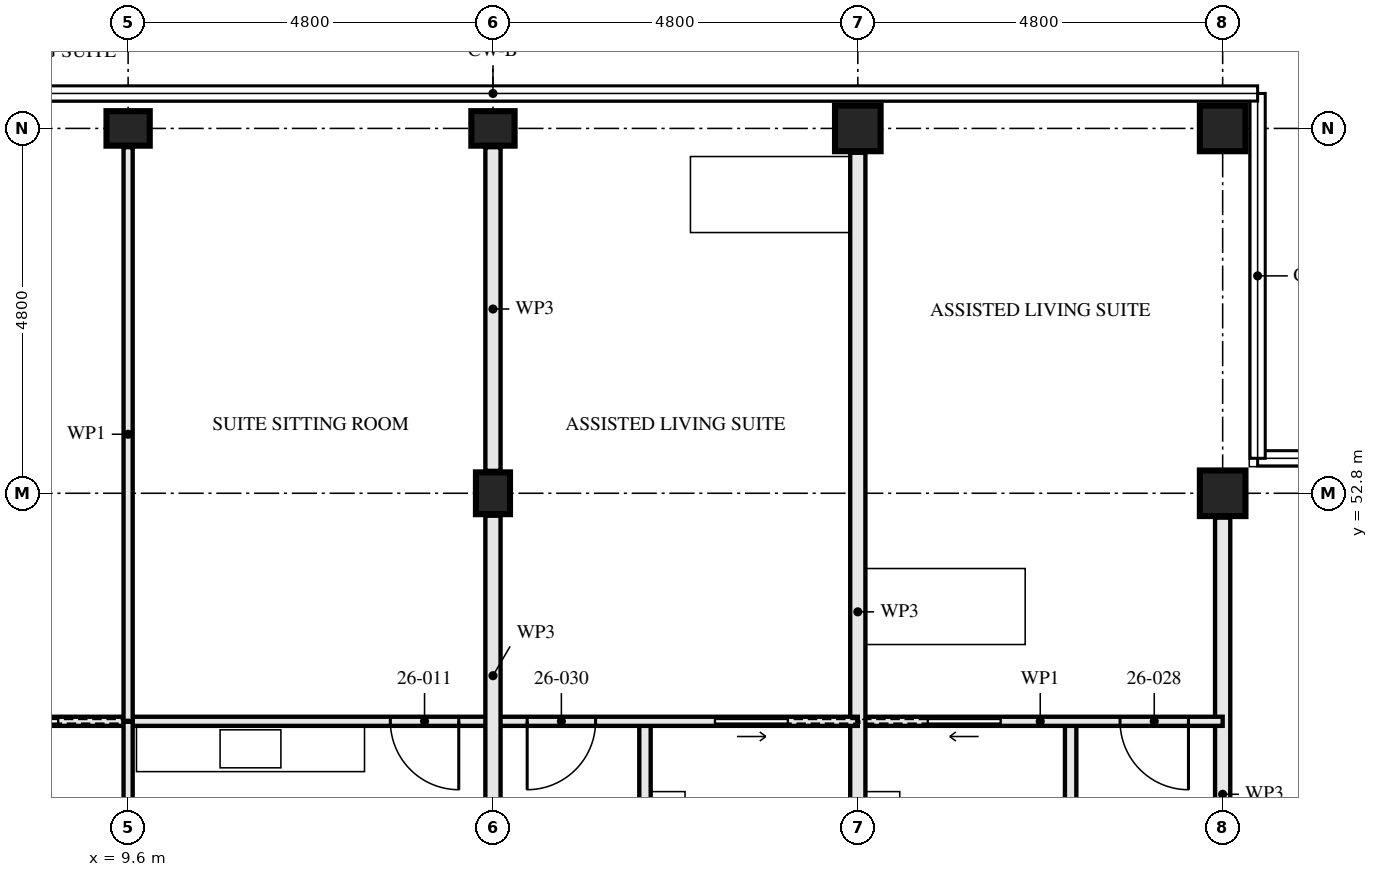
"""IFC4 building model, lengths in metres.
Left out: names, types, materials, properties, quantities, classifications, styles, units other than length and angle.
Written with IfcOpenShell. Run it as: python <this file> out.ifc"""

import sys

from ifc_helpers import new_model, si_unit, direction, frame, frame_2d, origin, origin_2d, place, context, subcontext, project, spatial, rectangle, hollow_rectangle, i_section, extrude, element, fill, save


model = new_model("IFC4")
c1 = context("Model", 3, precision=1e-05, world=origin(), true_north=direction((0.0, 1.0)))
c2 = subcontext(c1, "Body", "Model", "MODEL_VIEW")
j1 = project(units=[si_unit("LENGTHUNIT", "METRE"), si_unit("PLANEANGLEUNIT", "RADIAN")], contexts=[c1])
p1 = place(None, origin())
s1 = spatial("IfcSite", under=j1, at=p1, CompositionType="ELEMENT")
p2 = place(p1, origin())
s2 = spatial("IfcBuilding", under=s1, at=p2, CompositionType="ELEMENT")
p3 = place(p2, frame((0.0, 0.0, 98.0)))
s3 = spatial("IfcBuildingStorey", under=s2, at=p3, CompositionType="ELEMENT", Elevation=98.0)
p4 = place(p3, frame((9.6, 57.6, 0.0), z_axis=(0.0, 0.0, 1.0), x_axis=(0.0, 1.0, 0.0)))
e1 = element("IfcColumn", 1, at=p4, inside=s3, PredefinedType="COLUMN", context=c2, shape_type="SweptSolid", body=[
    extrude(i_section(OverallWidth=0.454, OverallDepth=0.569, WebThickness=0.078, FlangeThickness=0.125, FilletRadius=0.015, at=origin_2d()), origin(), (0.0, 0.0, 1.0), 3.5),
])
p5 = place(p3, frame((14.4, 52.8, 0.0), z_axis=(0.0, 0.0, 1.0), x_axis=(1.0, 0.0, 0.0)))
e2 = element("IfcColumn", 2, at=p5, inside=s3, PredefinedType="COLUMN", context=c2, shape_type="SweptSolid", body=[
    extrude(i_section(OverallWidth=0.448, OverallDepth=0.55, WebThickness=0.072, FlangeThickness=0.115, FilletRadius=0.015, at=origin_2d()), origin(), (0.0, 0.0, 1.0), 3.5),
])
p6 = place(p3, frame((14.4, 57.6, 0.0), z_axis=(0.0, 0.0, 1.0), x_axis=(0.0, 1.0, 0.0)))
e3 = element("IfcColumn", 3, at=p6, inside=s3, PredefinedType="COLUMN", context=c2, shape_type="SweptSolid", body=[
    extrude(i_section(OverallWidth=0.454, OverallDepth=0.569, WebThickness=0.078, FlangeThickness=0.125, FilletRadius=0.015, at=origin_2d()), origin(), (0.0, 0.0, 1.0), 3.5),
])
for number, where, z_axis, x_axis in (
    (4, (19.2, 57.6, 0.0), (0.0, 0.0, 1.0), (0.0, 1.0, 0.0)),
    (5, (24.0, 52.8, 0.0), (0.0, 0.0, 1.0), (0.0, 1.0, 0.0)),
    (6, (24.0, 57.6, 0.0), (0.0, 0.0, 1.0), (0.0, 1.0, 0.0)),
):
    element("IfcColumn", number, at=place(p3, frame(where, z_axis=z_axis, x_axis=x_axis)), inside=s3, PredefinedType="COLUMN", context=c2, shape_type="SweptSolid", body=[
        extrude(hollow_rectangle(XDim=0.6, YDim=0.6, WallThickness=0.06, at=origin_2d()), origin(), (0.0, 0.0, 1.0), 3.5),
    ])
p7 = place(p3, frame((9.6, 49.8, 0.0), z_axis=(0.0, 0.0, 1.0), x_axis=(0.0, -1.0, 0.0)))
e7 = element("IfcWall", 7, at=p7, inside=s3, PredefinedType="PARTITIONING", context=c2, shape_type="SweptSolid", body=[
    extrude(rectangle(XDim=4.65, YDim=0.12, at=frame_2d((2.325, 0.0))), origin(), (0.0, 0.0, 1.0), 2.55),
])
p8 = place(p7, frame((3.35, 0.0, 0.0)))
e8 = element("IfcOpeningElement", 8, at=p8, cuts=e7, PredefinedType="OPENING", context=c2, shape_type="SweptSolid", body=[
    extrude(rectangle(XDim=0.9, YDim=2.1, at=frame_2d((0.45, 1.05))), frame((0.0, 0.071, 0.0), z_axis=(0.0, -1.0, 0.0), x_axis=(1.0, 0.0, 0.0)), (0.0, 0.0, 1.0), 0.141),
])
p9 = place(p3, frame((14.4, 49.8, 0.0), z_axis=(0.0, 0.0, 1.0), x_axis=(-1.0, 0.0, 0.0)))
e9 = element("IfcWall", 9, at=p9, inside=s3, PredefinedType="PARTITIONING", context=c2, shape_type="SweptSolid", body=[
    extrude(rectangle(XDim=4.8, YDim=0.12, at=frame_2d((2.4, 0.0))), origin(), (0.0, 0.0, 1.0), 3.33),
])
p10 = place(p9, frame((0.45, 0.0, 0.0)))
e10 = element("IfcOpeningElement", 10, at=p10, cuts=e9, PredefinedType="OPENING", context=c2, shape_type="SweptSolid", body=[
    extrude(rectangle(XDim=0.9, YDim=2.1, at=frame_2d((0.45, 1.05))), frame((0.0, 0.071, 0.0), z_axis=(0.0, -1.0, 0.0), x_axis=(1.0, 0.0, 0.0)), (0.0, 0.0, 1.0), 0.141),
])
p11 = place(p3, frame((9.6, 49.8, 0.0), z_axis=(0.0, 0.0, 1.0), x_axis=(-1.0, 0.0, 0.0)))
e11 = element("IfcWall", 11, at=p11, inside=s3, PredefinedType="PARTITIONING", context=c2, shape_type="SweptSolid", body=[
    extrude(rectangle(XDim=4.8, YDim=0.12, at=frame_2d((2.4, 0.0))), origin(), (0.0, 0.0, 1.0), 3.33),
])
p12 = place(p11, frame((3.45, 0.0, 0.0)))
e12 = element("IfcOpeningElement", 12, at=p12, cuts=e11, PredefinedType="OPENING", context=c2, shape_type="SweptSolid", body=[
    extrude(rectangle(XDim=0.9, YDim=2.1, at=frame_2d((0.45, 1.05))), frame((0.0, 0.071, 0.0), z_axis=(0.0, -1.0, 0.0), x_axis=(1.0, 0.0, 0.0)), (0.0, 0.0, 1.0), 0.141),
])
p13 = place(p11, frame((0.925, 0.0, 0.0)))
e13 = element("IfcOpeningElement", 13, at=p13, cuts=e11, PredefinedType="OPENING", context=c2, shape_type="SweptSolid", body=[
    extrude(rectangle(XDim=0.95, YDim=2.1, at=frame_2d((0.475, 1.05))), frame((0.0, 0.071, 0.0), z_axis=(0.0, -1.0, 0.0), x_axis=(1.0, 0.0, 0.0)), (0.0, 0.0, 1.0), 0.141),
])
p14 = place(p3, frame((9.6, 57.353, 0.0), z_axis=(0.0, 0.0, 1.0), x_axis=(0.0, -1.0, 0.0)))
e14 = element("IfcWall", 14, at=p14, inside=s3, PredefinedType="PARTITIONING", context=c2, shape_type="SweptSolid", body=[
    extrude(rectangle(XDim=7.553, YDim=0.12, at=frame_2d((3.776, 0.0))), origin(), (0.0, 0.0, 1.0), 2.55),
])
p15 = place(p3, frame((24.0, 52.48, 0.0), z_axis=(0.0, 0.0, 1.0), x_axis=(0.0, -1.0, 0.0)))
e15 = element("IfcWall", 15, at=p15, inside=s3, PredefinedType="PARTITIONING", context=c2, shape_type="SweptSolid", body=[
    extrude(rectangle(XDim=7.28, YDim=0.2, at=frame_2d((3.64, 0.0))), origin(), (0.0, 0.0, 1.0), 2.55),
])
p16 = place(p3, frame((22.0, 49.8, 0.0), z_axis=(0.0, 0.0, 1.0), x_axis=(0.0, -1.0, 0.0)))
e16 = element("IfcWall", 16, at=p16, inside=s3, PredefinedType="PARTITIONING", context=c2, shape_type="SweptSolid", body=[
    extrude(rectangle(XDim=3.0, YDim=0.15, at=frame_2d((1.5, 0.0))), origin(), (0.0, 0.0, 1.0), 2.55),
])
p17 = place(p3, frame((24.0, 49.8, 0.0), z_axis=(0.0, 0.0, 1.0), x_axis=(-1.0, 0.0, 0.0)))
e17 = element("IfcWall", 17, at=p17, inside=s3, PredefinedType="PARTITIONING", context=c2, shape_type="SweptSolid", body=[
    extrude(rectangle(XDim=4.8, YDim=0.12, at=frame_2d((2.4, 0.0))), origin(), (0.0, 0.0, 1.0), 3.33),
])
p18 = place(p17, frame((0.45, 0.0, 0.0)))
e18 = element("IfcOpeningElement", 18, at=p18, cuts=e17, PredefinedType="OPENING", context=c2, shape_type="SweptSolid", body=[
    extrude(rectangle(XDim=0.9, YDim=2.1, at=frame_2d((0.45, 1.05))), frame((0.0, 0.071, 0.0), z_axis=(0.0, -1.0, 0.0), x_axis=(1.0, 0.0, 0.0)), (0.0, 0.0, 1.0), 0.141),
])
p19 = place(p17, frame((2.925, 0.0, 0.0)))
e19 = element("IfcOpeningElement", 19, at=p19, cuts=e17, PredefinedType="OPENING", context=c2, shape_type="SweptSolid", body=[
    extrude(rectangle(XDim=0.95, YDim=2.1, at=frame_2d((0.475, 1.05))), frame((0.0, 0.071, 0.0), z_axis=(0.0, -1.0, 0.0), x_axis=(1.0, 0.0, 0.0)), (0.0, 0.0, 1.0), 0.141),
])
p20 = place(p3, frame((19.2, 57.28, 0.0), z_axis=(0.0, 0.0, 1.0), x_axis=(0.0, -1.0, 0.0)))
e20 = element("IfcWall", 20, at=p20, inside=s3, PredefinedType="PARTITIONING", context=c2, shape_type="SweptSolid", body=[
    extrude(rectangle(XDim=12.08, YDim=0.2, at=frame_2d((6.04, 0.0))), origin(), (0.0, 0.0, 1.0), 2.55),
])
p21 = place(p3, frame((16.4, 49.8, 0.0), z_axis=(0.0, 0.0, 1.0), x_axis=(0.0, -1.0, 0.0)))
e21 = element("IfcWall", 21, at=p21, inside=s3, PredefinedType="PARTITIONING", context=c2, shape_type="SweptSolid", body=[
    extrude(rectangle(XDim=3.0, YDim=0.15, at=frame_2d((1.5, 0.0))), origin(), (0.0, 0.0, 1.0), 2.55),
])
p22 = place(p3, frame((19.2, 49.8, 0.0), z_axis=(0.0, 0.0, 1.0), x_axis=(-1.0, 0.0, 0.0)))
e22 = element("IfcWall", 22, at=p22, inside=s3, PredefinedType="PARTITIONING", context=c2, shape_type="SweptSolid", body=[
    extrude(rectangle(XDim=4.8, YDim=0.12, at=frame_2d((2.4, 0.0))), origin(), (0.0, 0.0, 1.0), 3.33),
])
p23 = place(p22, frame((3.45, 0.0, 0.0)))
e23 = element("IfcOpeningElement", 23, at=p23, cuts=e22, PredefinedType="OPENING", context=c2, shape_type="SweptSolid", body=[
    extrude(rectangle(XDim=0.9, YDim=2.1, at=frame_2d((0.45, 1.05))), frame((0.0, 0.071, 0.0), z_axis=(0.0, -1.0, 0.0), x_axis=(1.0, 0.0, 0.0)), (0.0, 0.0, 1.0), 0.141),
])
p24 = place(p22, frame((0.925, 0.0, 0.0)))
e24 = element("IfcOpeningElement", 24, at=p24, cuts=e22, PredefinedType="OPENING", context=c2, shape_type="SweptSolid", body=[
    extrude(rectangle(XDim=0.95, YDim=2.1, at=frame_2d((0.475, 1.05))), frame((0.0, 0.071, 0.0), z_axis=(0.0, -1.0, 0.0), x_axis=(1.0, 0.0, 0.0)), (0.0, 0.0, 1.0), 0.141),
])
p25 = place(p3, frame((14.4, 48.295, 0.0), z_axis=(0.0, 0.0, 1.0), x_axis=(0.0, 1.0, 0.0)))
e25 = element("IfcWall", 25, at=p25, inside=s3, PredefinedType="PARTITIONING", context=c2, shape_type="SweptSolid", body=[
    extrude(rectangle(XDim=4.21, YDim=0.2, at=frame_2d((2.105, 0.0))), origin(), (0.0, 0.0, 1.0), 2.32),
])
p26 = place(p3, frame((14.4, 53.095, 0.0), z_axis=(0.0, 0.0, 1.0), x_axis=(0.0, 1.0, 0.0)))
e26 = element("IfcWall", 26, at=p26, inside=s3, PredefinedType="PARTITIONING", context=c2, shape_type="SweptSolid", body=[
    extrude(rectangle(XDim=4.258, YDim=0.2, at=frame_2d((2.129, 0.0))), origin(), (0.0, 0.0, 1.0), 2.32),
])
p27 = place(p10, origin())
e27 = element("IfcDoor", 27, at=p27, inside=s3, OperationType="SINGLE_SWING_RIGHT", PredefinedType="DOOR", context=c2, shape_type="SweptSolid", body=[
    extrude(rectangle(XDim=0.9, YDim=2.1, at=frame_2d((0.45, 1.05))), frame((0.0, 0.022, 0.0), z_axis=(0.0, -1.0, 0.0), x_axis=(1.0, 0.0, 0.0)), (0.0, 0.0, 1.0), 0.044),
])
fill(e10, e27)
p28 = place(p13, origin())
e28 = element("IfcDoor", 28, at=p28, inside=s3, OperationType="SLIDING_TO_RIGHT", PredefinedType="DOOR", context=c2, shape_type="SweptSolid", body=[
    extrude(rectangle(XDim=0.95, YDim=2.1, at=frame_2d((0.475, 1.05))), frame((0.0, 0.022, 0.0), z_axis=(0.0, -1.0, 0.0), x_axis=(1.0, 0.0, 0.0)), (0.0, 0.0, 1.0), 0.044),
])
fill(e13, e28)
p29 = place(p18, origin())
e29 = element("IfcDoor", 29, at=p29, inside=s3, OperationType="SINGLE_SWING_RIGHT", PredefinedType="DOOR", context=c2, shape_type="SweptSolid", body=[
    extrude(rectangle(XDim=0.9, YDim=2.1, at=frame_2d((0.45, 1.05))), frame((0.0, 0.022, 0.0), z_axis=(0.0, -1.0, 0.0), x_axis=(1.0, 0.0, 0.0)), (0.0, 0.0, 1.0), 0.044),
])
fill(e18, e29)
p30 = place(p19, origin())
e30 = element("IfcDoor", 30, at=p30, inside=s3, OperationType="SLIDING_TO_LEFT", PredefinedType="DOOR", context=c2, shape_type="SweptSolid", body=[
    extrude(rectangle(XDim=0.95, YDim=2.1, at=frame_2d((0.475, 1.05))), frame((0.0, 0.022, 0.0), z_axis=(0.0, -1.0, 0.0), x_axis=(1.0, 0.0, 0.0)), (0.0, 0.0, 1.0), 0.044),
])
fill(e19, e30)
p31 = place(p23, origin())
e31 = element("IfcDoor", 31, at=p31, inside=s3, OperationType="SINGLE_SWING_LEFT", PredefinedType="DOOR", context=c2, shape_type="SweptSolid", body=[
    extrude(rectangle(XDim=0.9, YDim=2.1, at=frame_2d((0.45, 1.05))), frame((0.0, 0.022, 0.0), z_axis=(0.0, -1.0, 0.0), x_axis=(1.0, 0.0, 0.0)), (0.0, 0.0, 1.0), 0.044),
])
fill(e23, e31)
p32 = place(p24, origin())
e32 = element("IfcDoor", 32, at=p32, inside=s3, OperationType="SLIDING_TO_RIGHT", PredefinedType="DOOR", context=c2, shape_type="SweptSolid", body=[
    extrude(rectangle(XDim=0.95, YDim=2.1, at=frame_2d((0.475, 1.05))), frame((0.0, 0.022, 0.0), z_axis=(0.0, -1.0, 0.0), x_axis=(1.0, 0.0, 0.0)), (0.0, 0.0, 1.0), 0.044),
])
fill(e24, e32)
save(model, sys.argv[1])
